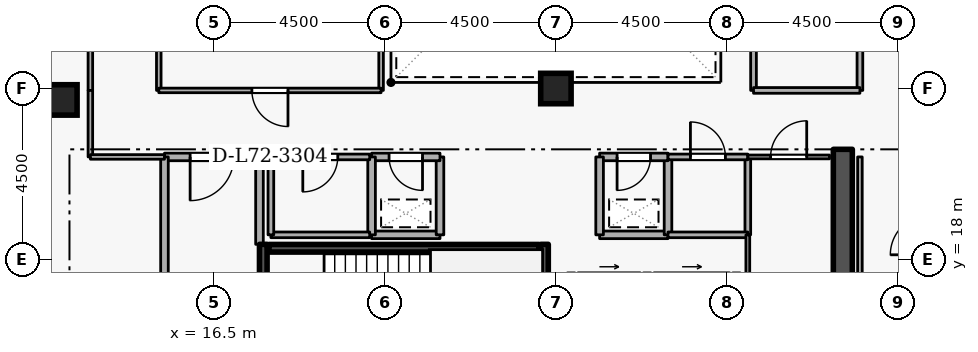
"""IFC4 building model, lengths in metres.
Left out: names, types, materials, properties, quantities, classifications, styles, units other than length and angle.
Written with IfcOpenShell. Run it as: python <this file> out.ifc"""

import sys

from ifc_helpers import new_model, si_unit, direction, frame, frame_2d, origin, origin_2d, place, context, subcontext, project, spatial, rectangle, extrude, element, fill, save


model = new_model("IFC4")
c1 = context("Model", 3, precision=1e-05, world=origin(), true_north=direction((0.0, 1.0)))
c2 = subcontext(c1, "Body", "Model", "MODEL_VIEW")
j1 = project(units=[si_unit("LENGTHUNIT", "METRE"), si_unit("PLANEANGLEUNIT", "RADIAN")], contexts=[c1])
p1 = place(None, origin())
s1 = spatial("IfcSite", under=j1, at=p1, CompositionType="ELEMENT")
p2 = place(p1, origin())
s2 = spatial("IfcBuilding", under=s1, at=p2, CompositionType="ELEMENT")
p3 = place(p2, frame((0.0, 0.0, 269.1)))
s3 = spatial("IfcBuildingStorey", under=s2, at=p3, CompositionType="ELEMENT", Elevation=269.1)
p4 = place(p3, frame((33.05, 15.1, 0.0), z_axis=(0.0, 0.0, 1.0), x_axis=(0.0, 1.0, 0.0)))
e1 = element("IfcWall", 1, at=p4, inside=s3, PredefinedType="SHEAR", context=c2, shape_type="SweptSolid", body=[
    extrude(rectangle(XDim=5.8, YDim=0.5, at=frame_2d((2.9, 0.0))), origin(), (0.0, 0.0, 1.0), 3.6),
])
for number, where, z_axis, x_axis in (
    (2, (12.5, 22.2, 0.0), (0.0, 0.0, 1.0), (1.0, 0.0, 0.0)),
    (3, (25.5, 22.5, 0.0), (0.0, 0.0, 1.0), (1.0, 0.0, 0.0)),
):
    element("IfcColumn", number, at=place(p3, frame(where, z_axis=z_axis, x_axis=x_axis)), inside=s3, PredefinedType="COLUMN", context=c2, shape_type="SweptSolid", body=[
        extrude(rectangle(XDim=0.8, YDim=0.8, at=origin_2d()), origin(), (0.0, 0.0, 1.0), 3.6),
    ])
p5 = place(p3, frame((26.08, 17.55, 0.0), z_axis=(0.0, 0.0, 1.0), x_axis=(1.0, 0.0, 0.0)))
e4 = element("IfcWall", 4, at=p5, inside=s3, PredefinedType="STANDARD", context=c2, shape_type="SweptSolid", body=[
    extrude(rectangle(XDim=1.64, YDim=0.2, at=frame_2d((0.82, 0.0))), origin(), (0.0, 0.0, 1.0), 3.34),
])
p6 = place(p5, frame((0.31, 0.0, 0.0)))
e5 = element("IfcOpeningElement", 5, at=p6, cuts=e4, PredefinedType="OPENING", context=c2, shape_type="SweptSolid", body=[
    extrude(rectangle(XDim=1.02, YDim=2.06, at=frame_2d((0.51, 1.03))), frame((0.0, 0.11, 0.0), z_axis=(0.0, -1.0, 0.0), x_axis=(1.0, 0.0, 0.0)), (0.0, 0.0, 1.0), 0.22),
])
p7 = place(p3, frame((28.08, 17.55, 0.0), z_axis=(0.0, 0.0, 1.0), x_axis=(1.0, 0.0, 0.0)))
e6 = element("IfcWall", 6, at=p7, inside=s3, PredefinedType="STANDARD", context=c2, shape_type="SweptSolid", body=[
    extrude(rectangle(XDim=1.99, YDim=0.2, at=frame_2d((0.995, 0.0))), origin(), (0.0, 0.0, 1.0), 3.34),
])
p8 = place(p7, frame((0.485, 0.0, 0.0)))
e7 = element("IfcOpeningElement", 7, at=p8, cuts=e6, PredefinedType="OPENING", context=c2, shape_type="SweptSolid", body=[
    extrude(rectangle(XDim=1.02, YDim=2.06, at=frame_2d((0.51, 1.03))), frame((0.0, 0.11, 0.0), z_axis=(0.0, -1.0, 0.0), x_axis=(1.0, 0.0, 0.0)), (0.0, 0.0, 1.0), 0.22),
])
p9 = place(p3, frame((17.8, 15.05, 0.0), z_axis=(0.0, 0.0, 1.0), x_axis=(0.0, 1.0, 0.0)))
e8 = element("IfcWall", 8, at=p9, inside=s3, PredefinedType="SHEAR", context=c2, shape_type="SweptSolid", body=[
    extrude(rectangle(XDim=3.35, YDim=0.2, at=frame_2d((1.675, 0.0))), origin(), (0.0, 0.0, 1.0), 3.6),
])
p10 = place(p9, frame((1.125, 0.0, 0.0)))
e9 = element("IfcOpeningElement", 9, at=p10, cuts=e8, PredefinedType="OPENING", context=c2, shape_type="SweptSolid", body=[
    extrude(rectangle(XDim=1.1, YDim=2.1, at=frame_2d((0.55, 1.05))), frame((0.0, 0.11, 0.0), z_axis=(0.0, -1.0, 0.0), x_axis=(1.0, 0.0, 0.0)), (0.0, 0.0, 1.0), 0.22),
])
p11 = place(p3, frame((25.2, 18.4, 0.0), z_axis=(0.0, 0.0, 1.0), x_axis=(0.0, -1.0, 0.0)))
e10 = element("IfcWall", 10, at=p11, inside=s3, PredefinedType="SHEAR", context=c2, shape_type="SweptSolid", body=[
    extrude(rectangle(XDim=3.35, YDim=0.2, at=frame_2d((1.675, 0.0))), origin(), (0.0, 0.0, 1.0), 3.6),
])
p12 = place(p3, frame((25.05, 18.297, 0.0), z_axis=(0.0, 0.0, 1.0), x_axis=(-1.0, 0.0, 0.0)))
e11 = element("IfcWall", 11, at=p12, inside=s3, PredefinedType="SHEAR", context=c2, shape_type="SweptSolid", body=[
    extrude(rectangle(XDim=7.1, YDim=0.2, at=frame_2d((3.55, 0.0))), origin(), (0.0, 0.0, 1.0), 3.6),
])
p13 = place(p3, frame((17.7, 18.4, 0.0), z_axis=(0.0, 0.0, 1.0), x_axis=(0.0, 1.0, 0.0)))
e12 = element("IfcWall", 12, at=p13, inside=s3, PredefinedType="STANDARD", context=c2, shape_type="SweptSolid", body=[
    extrude(rectangle(XDim=2.3, YDim=0.2, at=frame_2d((1.15, 0.0))), origin(), (0.0, 0.0, 1.0), 2.545),
])
p14 = place(p3, frame((17.7, 20.7, 0.0), z_axis=(0.0, 0.0, 1.0), x_axis=(-1.0, 0.0, 0.0)))
e13 = element("IfcWall", 13, at=p14, inside=s3, PredefinedType="STANDARD", context=c2, shape_type="SweptSolid", body=[
    extrude(rectangle(XDim=2.5, YDim=0.2, at=frame_2d((1.25, 0.0))), origin(), (0.0, 0.0, 1.0), 3.34),
])
p15 = place(p14, frame((0.675, 0.0, 0.0)))
e14 = element("IfcOpeningElement", 14, at=p15, cuts=e13, PredefinedType="OPENING", context=c2, shape_type="SweptSolid", body=[
    extrude(rectangle(XDim=1.15, YDim=2.1, at=frame_2d((0.575, 1.05))), frame((0.0, 0.11, 0.0), z_axis=(0.0, -1.0, 0.0), x_axis=(1.0, 0.0, 0.0)), (0.0, 0.0, 1.0), 0.22),
])
p16 = place(p3, frame((15.2, 20.7, 0.0), z_axis=(0.0, 0.0, 1.0), x_axis=(0.0, -1.0, 0.0)))
e15 = element("IfcWall", 15, at=p16, inside=s3, PredefinedType="STANDARD", context=c2, shape_type="SweptSolid", body=[
    extrude(rectangle(XDim=5.7, YDim=0.2, at=frame_2d((2.85, 0.0))), origin(), (0.0, 0.0, 1.0), 3.34),
])
p17 = place(p3, frame((26.65, 18.65, 0.0), z_axis=(0.0, 0.0, 1.0), x_axis=(1.0, 0.0, 0.0)))
e16 = element("IfcWall", 16, at=p17, inside=s3, PredefinedType="STANDARD", context=c2, shape_type="SweptSolid", body=[
    extrude(rectangle(XDim=1.8, YDim=0.2, at=frame_2d((0.9, 0.0))), origin(), (0.0, 0.0, 1.0), 3.34),
])
p18 = place(p3, frame((28.45, 18.65, 0.0), z_axis=(0.0, 0.0, 1.0), x_axis=(0.0, 1.0, 0.0)))
e17 = element("IfcWall", 17, at=p18, inside=s3, PredefinedType="STANDARD", context=c2, shape_type="SweptSolid", body=[
    extrude(rectangle(XDim=2.05, YDim=0.2, at=frame_2d((1.025, 0.0))), origin(), (0.0, 0.0, 1.0), 3.34),
])
p19 = place(p3, frame((28.45, 20.7, 0.0), z_axis=(0.0, 0.0, 1.0), x_axis=(-1.0, 0.0, 0.0)))
e18 = element("IfcWall", 18, at=p19, inside=s3, PredefinedType="STANDARD", context=c2, shape_type="SweptSolid", body=[
    extrude(rectangle(XDim=1.8, YDim=0.2, at=frame_2d((0.9, 0.0))), origin(), (0.0, 0.0, 1.0), 3.34),
])
p20 = place(p19, frame((0.46, 0.0, 0.0)))
e19 = element("IfcOpeningElement", 19, at=p20, cuts=e18, PredefinedType="OPENING", context=c2, shape_type="SweptSolid", body=[
    extrude(rectangle(XDim=0.88, YDim=2.04, at=frame_2d((0.44, 1.02))), frame((0.0, 0.11, 0.0), z_axis=(0.0, -1.0, 0.0), x_axis=(1.0, 0.0, 0.0)), (0.0, 0.0, 1.0), 0.22),
])
p21 = place(p3, frame((26.65, 20.7, 0.0), z_axis=(0.0, 0.0, 1.0), x_axis=(0.0, -1.0, 0.0)))
e20 = element("IfcWall", 20, at=p21, inside=s3, PredefinedType="STANDARD", context=c2, shape_type="SweptSolid", body=[
    extrude(rectangle(XDim=2.05, YDim=0.2, at=frame_2d((1.025, 0.0))), origin(), (0.0, 0.0, 1.0), 3.34),
])
p22 = place(p3, frame((20.65, 18.65, 0.0), z_axis=(0.0, 0.0, 1.0), x_axis=(1.0, 0.0, 0.0)))
e21 = element("IfcWall", 21, at=p22, inside=s3, PredefinedType="STANDARD", context=c2, shape_type="SweptSolid", body=[
    extrude(rectangle(XDim=1.8, YDim=0.2, at=frame_2d((0.9, 0.0))), origin(), (0.0, 0.0, 1.0), 3.34),
])
p23 = place(p3, frame((22.45, 18.65, 0.0), z_axis=(0.0, 0.0, 1.0), x_axis=(0.0, 1.0, 0.0)))
e22 = element("IfcWall", 22, at=p23, inside=s3, PredefinedType="STANDARD", context=c2, shape_type="SweptSolid", body=[
    extrude(rectangle(XDim=2.05, YDim=0.2, at=frame_2d((1.025, 0.0))), origin(), (0.0, 0.0, 1.0), 3.34),
])
p24 = place(p3, frame((22.45, 20.7, 0.0), z_axis=(0.0, 0.0, 1.0), x_axis=(-1.0, 0.0, 0.0)))
e23 = element("IfcWall", 23, at=p24, inside=s3, PredefinedType="STANDARD", context=c2, shape_type="SweptSolid", body=[
    extrude(rectangle(XDim=1.8, YDim=0.2, at=frame_2d((0.9, 0.0))), origin(), (0.0, 0.0, 1.0), 3.34),
])
p25 = place(p24, frame((0.46, 0.0, 0.0)))
e24 = element("IfcOpeningElement", 24, at=p25, cuts=e23, PredefinedType="OPENING", context=c2, shape_type="SweptSolid", body=[
    extrude(rectangle(XDim=0.88, YDim=2.04, at=frame_2d((0.44, 1.02))), frame((0.0, 0.11, 0.0), z_axis=(0.0, -1.0, 0.0), x_axis=(1.0, 0.0, 0.0)), (0.0, 0.0, 1.0), 0.22),
])
p26 = place(p3, frame((20.65, 20.7, 0.0), z_axis=(0.0, 0.0, 1.0), x_axis=(0.0, -1.0, 0.0)))
e25 = element("IfcWall", 25, at=p26, inside=s3, PredefinedType="STANDARD", context=c2, shape_type="SweptSolid", body=[
    extrude(rectangle(XDim=2.05, YDim=0.2, at=frame_2d((1.025, 0.0))), origin(), (0.0, 0.0, 1.0), 3.34),
])
p27 = place(p3, frame((18.0, 18.65, 0.0), z_axis=(0.0, 0.0, 1.0), x_axis=(1.0, 0.0, 0.0)))
e26 = element("IfcWall", 26, at=p27, inside=s3, PredefinedType="PARTITIONING", context=c2, shape_type="SweptSolid", body=[
    extrude(rectangle(XDim=2.6, YDim=0.15, at=frame_2d((1.3, 0.0))), origin(), (0.0, 0.0, 1.0), 3.34),
])
p28 = place(p3, frame((20.6, 20.7, 0.0), z_axis=(0.0, 0.0, 1.0), x_axis=(-1.0, 0.0, 0.0)))
e27 = element("IfcWall", 27, at=p28, inside=s3, PredefinedType="PARTITIONING", context=c2, shape_type="SweptSolid", body=[
    extrude(rectangle(XDim=2.6, YDim=0.15, at=frame_2d((1.3, 0.0))), origin(), (0.0, 0.0, 1.0), 3.34),
])
p29 = place(p28, frame((0.84, 0.0, 0.0)))
e28 = element("IfcOpeningElement", 28, at=p29, cuts=e27, PredefinedType="OPENING", context=c2, shape_type="SweptSolid", body=[
    extrude(rectangle(XDim=0.92, YDim=2.08, at=frame_2d((0.46, 1.04))), frame((0.0, 0.085, 0.0), z_axis=(0.0, -1.0, 0.0), x_axis=(1.0, 0.0, 0.0)), (0.0, 0.0, 1.0), 0.17),
])
p30 = place(p3, frame((18.0, 20.7, 0.0), z_axis=(0.0, 0.0, 1.0), x_axis=(0.0, -1.0, 0.0)))
e29 = element("IfcWall", 29, at=p30, inside=s3, PredefinedType="PARTITIONING", context=c2, shape_type="SweptSolid", body=[
    extrude(rectangle(XDim=2.05, YDim=0.15, at=frame_2d((1.025, 0.0))), origin(), (0.0, 0.0, 1.0), 2.545),
])
p31 = place(p3, frame((30.55, 20.7, 0.0), z_axis=(0.0, 0.0, 1.0), x_axis=(0.0, -1.0, 0.0)))
e30 = element("IfcWall", 30, at=p31, inside=s3, PredefinedType="PARTITIONING", context=c2, shape_type="SweptSolid", body=[
    extrude(rectangle(XDim=2.05, YDim=0.15, at=frame_2d((1.025, 0.0))), origin(), (0.0, 0.0, 1.0), 3.34),
])
p32 = place(p3, frame((30.55, 18.65, 0.0), z_axis=(0.0, 0.0, 1.0), x_axis=(-1.0, 0.0, 0.0)))
e31 = element("IfcWall", 31, at=p32, inside=s3, PredefinedType="PARTITIONING", context=c2, shape_type="SweptSolid", body=[
    extrude(rectangle(XDim=2.1, YDim=0.15, at=frame_2d((1.05, 0.0))), origin(), (0.0, 0.0, 1.0), 3.34),
])
p33 = place(p3, frame((28.45, 20.7, 0.0), z_axis=(0.0, 0.0, 1.0), x_axis=(1.0, 0.0, 0.0)))
e32 = element("IfcWall", 32, at=p33, inside=s3, PredefinedType="PARTITIONING", context=c2, shape_type="SweptSolid", body=[
    extrude(rectangle(XDim=2.1, YDim=0.15, at=frame_2d((1.05, 0.0))), origin(), (0.0, 0.0, 1.0), 3.34),
])
p34 = place(p33, frame((0.59, 0.0, 0.0)))
e33 = element("IfcOpeningElement", 33, at=p34, cuts=e32, PredefinedType="OPENING", context=c2, shape_type="SweptSolid", body=[
    extrude(rectangle(XDim=0.92, YDim=2.08, at=frame_2d((0.46, 1.04))), frame((0.0, 0.085, 0.0), z_axis=(0.0, -1.0, 0.0), x_axis=(1.0, 0.0, 0.0)), (0.0, 0.0, 1.0), 0.17),
])
p35 = place(p3, frame((30.55, 15.1, 0.0), z_axis=(0.0, 0.0, 1.0), x_axis=(0.0, 1.0, 0.0)))
e34 = element("IfcWall", 34, at=p35, inside=s3, PredefinedType="PARTITIONING", context=c2, shape_type="SweptSolid", body=[
    extrude(rectangle(XDim=3.55, YDim=0.1, at=frame_2d((1.775, 0.0))), origin(), (0.0, 0.0, 1.0), 3.34),
])
p36 = place(p3, frame((30.55, 20.7, 0.0), z_axis=(0.0, 0.0, 1.0), x_axis=(1.0, 0.0, 0.0)))
e35 = element("IfcWall", 35, at=p36, inside=s3, PredefinedType="PARTITIONING", context=c2, shape_type="SweptSolid", body=[
    extrude(rectangle(XDim=2.15, YDim=0.1, at=frame_2d((1.075, 0.0))), origin(), (0.0, 0.0, 1.0), 3.34),
])
p37 = place(p36, frame((0.6, 0.0, 0.0)))
e36 = element("IfcOpeningElement", 36, at=p37, cuts=e35, PredefinedType="OPENING", context=c2, shape_type="SweptSolid", body=[
    extrude(rectangle(XDim=0.95, YDim=2.1, at=frame_2d((0.475, 1.05))), frame((0.0, 0.06, 0.0), z_axis=(0.0, -1.0, 0.0), x_axis=(1.0, 0.0, 0.0)), (0.0, 0.0, 1.0), 0.12),
])
p38 = place(p3, frame((33.5, 20.7, 0.0), z_axis=(0.0, 0.0, 1.0), x_axis=(0.0, -1.0, 0.0)))
e37 = element("IfcWall", 37, at=p38, inside=s3, PredefinedType="PARTITIONING", context=c2, shape_type="SweptSolid", body=[
    extrude(rectangle(XDim=5.9, YDim=0.12, at=frame_2d((2.95, 0.0))), origin(), (0.0, 0.0, 1.0), 3.34),
])
p39 = place(p3, frame((13.25, 28.2, 0.0), z_axis=(0.0, 0.0, 1.0), x_axis=(0.0, -1.0, 0.0)))
e38 = element("IfcWall", 38, at=p39, inside=s3, PredefinedType="PARTITIONING", context=c2, shape_type="SweptSolid", body=[
    extrude(rectangle(XDim=5.75, YDim=0.12, at=frame_2d((2.875, 0.0))), origin(), (0.0, 0.0, 1.0), 3.34),
])
p40 = place(p39, frame((2.35, 0.0, 0.0)))
e39 = element("IfcOpeningElement", 39, at=p40, cuts=e38, PredefinedType="OPENING", context=c2, shape_type="SweptSolid", body=[
    extrude(rectangle(XDim=1.05, YDim=2.1, at=frame_2d((0.525, 1.05))), frame((0.0, 0.07, 0.0), z_axis=(0.0, -1.0, 0.0), x_axis=(1.0, 0.0, 0.0)), (0.0, 0.0, 1.0), 0.14),
])
p41 = place(p3, frame((13.25, 22.45, 0.0), z_axis=(0.0, 0.0, 1.0), x_axis=(0.0, -1.0, 0.0)))
e40 = element("IfcWall", 40, at=p41, inside=s3, PredefinedType="PARTITIONING", context=c2, shape_type="SweptSolid", body=[
    extrude(rectangle(XDim=1.75, YDim=0.12, at=frame_2d((0.875, 0.0))), origin(), (0.0, 0.0, 1.0), 3.34),
])
p42 = place(p3, frame((13.25, 20.7, 0.0), z_axis=(0.0, 0.0, 1.0), x_axis=(1.0, 0.0, 0.0)))
e41 = element("IfcWall", 41, at=p42, inside=s3, PredefinedType="PARTITIONING", context=c2, shape_type="SweptSolid", body=[
    extrude(rectangle(XDim=1.95, YDim=0.12, at=frame_2d((0.975, 0.0))), origin(), (0.0, 0.0, 1.0), 3.34),
])
for number, where, z_axis, x_axis in (
    (42, (15.05, 22.45, 0.0), (0.0, 0.0, 1.0), (0.0, 1.0, 0.0)),
    (43, (20.9, 28.2, 0.0), (0.0, 0.0, 1.0), (0.0, -1.0, 0.0)),
):
    element("IfcWall", number, at=place(p3, frame(where, z_axis=z_axis, x_axis=x_axis)), inside=s3, PredefinedType="PARTITIONING", context=c2, shape_type="SweptSolid", body=[
        extrude(rectangle(XDim=5.75, YDim=0.12, at=frame_2d((2.875, 0.0))), origin(), (0.0, 0.0, 1.0), 3.34),
    ])
p43 = place(p3, frame((20.9, 22.45, 0.0), z_axis=(0.0, 0.0, 1.0), x_axis=(-1.0, 0.0, 0.0)))
e44 = element("IfcWall", 44, at=p43, inside=s3, PredefinedType="PARTITIONING", context=c2, shape_type="SweptSolid", body=[
    extrude(rectangle(XDim=5.85, YDim=0.12, at=frame_2d((2.925, 0.0))), origin(), (0.0, 0.0, 1.0), 3.34),
])
p44 = place(p43, frame((2.45, 0.0, 0.0)))
e45 = element("IfcOpeningElement", 45, at=p44, cuts=e44, PredefinedType="OPENING", context=c2, shape_type="SweptSolid", body=[
    extrude(rectangle(XDim=0.95, YDim=2.1, at=frame_2d((0.475, 1.05))), frame((0.0, 0.07, 0.0), z_axis=(0.0, -1.0, 0.0), x_axis=(1.0, 0.0, 0.0)), (0.0, 0.0, 1.0), 0.14),
])
p45 = place(p3, frame((30.7, 22.45, 0.0), z_axis=(0.0, 0.0, 1.0), x_axis=(0.0, 1.0, 0.0)))
e46 = element("IfcWall", 46, at=p45, inside=s3, PredefinedType="PARTITIONING", context=c2, shape_type="SweptSolid", body=[
    extrude(rectangle(XDim=4.55, YDim=0.15, at=frame_2d((2.275, 0.0))), origin(), (0.0, 0.0, 1.0), 3.34),
])
p46 = place(p3, frame((33.5, 27.0, 0.0), z_axis=(0.0, 0.0, 1.0), x_axis=(0.0, -1.0, 0.0)))
e47 = element("IfcWall", 47, at=p46, inside=s3, PredefinedType="PARTITIONING", context=c2, shape_type="SweptSolid", body=[
    extrude(rectangle(XDim=4.55, YDim=0.15, at=frame_2d((2.275, 0.0))), origin(), (0.0, 0.0, 1.0), 3.34),
])
p47 = place(p46, frame((1.625, 0.0, 0.0)))
e48 = element("IfcOpeningElement", 48, at=p47, cuts=e47, PredefinedType="OPENING", context=c2, shape_type="SweptSolid", body=[
    extrude(rectangle(XDim=1.3, YDim=2.12, at=frame_2d((0.65, 1.06))), frame((0.0, 0.085, 0.0), z_axis=(0.0, -1.0, 0.0), x_axis=(1.0, 0.0, 0.0)), (0.0, 0.0, 1.0), 0.17),
])
p48 = place(p3, frame((33.5, 22.45, 0.0), z_axis=(0.0, 0.0, 1.0), x_axis=(-1.0, 0.0, 0.0)))
e49 = element("IfcWall", 49, at=p48, inside=s3, PredefinedType="PARTITIONING", context=c2, shape_type="SweptSolid", body=[
    extrude(rectangle(XDim=2.8, YDim=0.15, at=frame_2d((1.4, 0.0))), origin(), (0.0, 0.0, 1.0), 3.34),
])
p49 = place(p15, origin())
e50 = element("IfcDoor", 50, at=p49, inside=s3, OperationType="SINGLE_SWING_RIGHT", PredefinedType="DOOR", context=c2, shape_type="SweptSolid", body=[
    extrude(rectangle(XDim=1.15, YDim=2.1, at=frame_2d((0.575, 1.05))), frame((0.0, 0.025, 0.0), z_axis=(0.0, -1.0, 0.0), x_axis=(1.0, 0.0, 0.0)), (0.0, 0.0, 1.0), 0.05),
])
fill(e14, e50)
p50 = place(p20, origin())
e51 = element("IfcDoor", 51, at=p50, inside=s3, OperationType="SINGLE_SWING_RIGHT", PredefinedType="DOOR", context=c2, shape_type="SweptSolid", body=[
    extrude(rectangle(XDim=0.88, YDim=2.04, at=frame_2d((0.44, 1.02))), frame((0.0, 0.025, 0.0), z_axis=(0.0, -1.0, 0.0), x_axis=(1.0, 0.0, 0.0)), (0.0, 0.0, 1.0), 0.05),
])
fill(e19, e51)
p51 = place(p25, origin())
e52 = element("IfcDoor", 52, at=p51, inside=s3, OperationType="SINGLE_SWING_LEFT", PredefinedType="DOOR", context=c2, shape_type="SweptSolid", body=[
    extrude(rectangle(XDim=0.88, YDim=2.04, at=frame_2d((0.44, 1.02))), frame((0.0, 0.025, 0.0), z_axis=(0.0, -1.0, 0.0), x_axis=(1.0, 0.0, 0.0)), (0.0, 0.0, 1.0), 0.05),
])
fill(e24, e52)
p52 = place(p29, origin())
e53 = element("IfcDoor", 53, at=p52, inside=s3, OperationType="SINGLE_SWING_RIGHT", PredefinedType="DOOR", context=c2, shape_type="SweptSolid", body=[
    extrude(rectangle(XDim=0.92, YDim=2.08, at=frame_2d((0.46, 1.04))), frame((0.0, 0.025, 0.0), z_axis=(0.0, -1.0, 0.0), x_axis=(1.0, 0.0, 0.0)), (0.0, 0.0, 1.0), 0.05),
])
fill(e28, e53)
p53 = place(p34, origin())
e54 = element("IfcDoor", 54, at=p53, inside=s3, OperationType="SINGLE_SWING_LEFT", PredefinedType="DOOR", context=c2, shape_type="SweptSolid", body=[
    extrude(rectangle(XDim=0.92, YDim=2.08, at=frame_2d((0.46, 1.04))), frame((0.0, 0.025, 0.0), z_axis=(0.0, -1.0, 0.0), x_axis=(1.0, 0.0, 0.0)), (0.0, 0.0, 1.0), 0.05),
])
fill(e33, e54)
p54 = place(p37, origin())
e55 = element("IfcDoor", 55, at=p54, inside=s3, OperationType="SINGLE_SWING_RIGHT", PredefinedType="DOOR", context=c2, shape_type="SweptSolid", body=[
    extrude(rectangle(XDim=0.95, YDim=2.1, at=frame_2d((0.475, 1.05))), frame((0.0, 0.025, 0.0), z_axis=(0.0, -1.0, 0.0), x_axis=(1.0, 0.0, 0.0)), (0.0, 0.0, 1.0), 0.05),
])
fill(e36, e55)
p55 = place(p44, origin())
e56 = element("IfcDoor", 56, at=p55, inside=s3, OperationType="SINGLE_SWING_LEFT", PredefinedType="DOOR", context=c2, shape_type="SweptSolid", body=[
    extrude(rectangle(XDim=0.95, YDim=2.1, at=frame_2d((0.475, 1.05))), frame((0.0, 0.025, 0.0), z_axis=(0.0, -1.0, 0.0), x_axis=(1.0, 0.0, 0.0)), (0.0, 0.0, 1.0), 0.05),
])
fill(e45, e56)
save(model, sys.argv[1])
